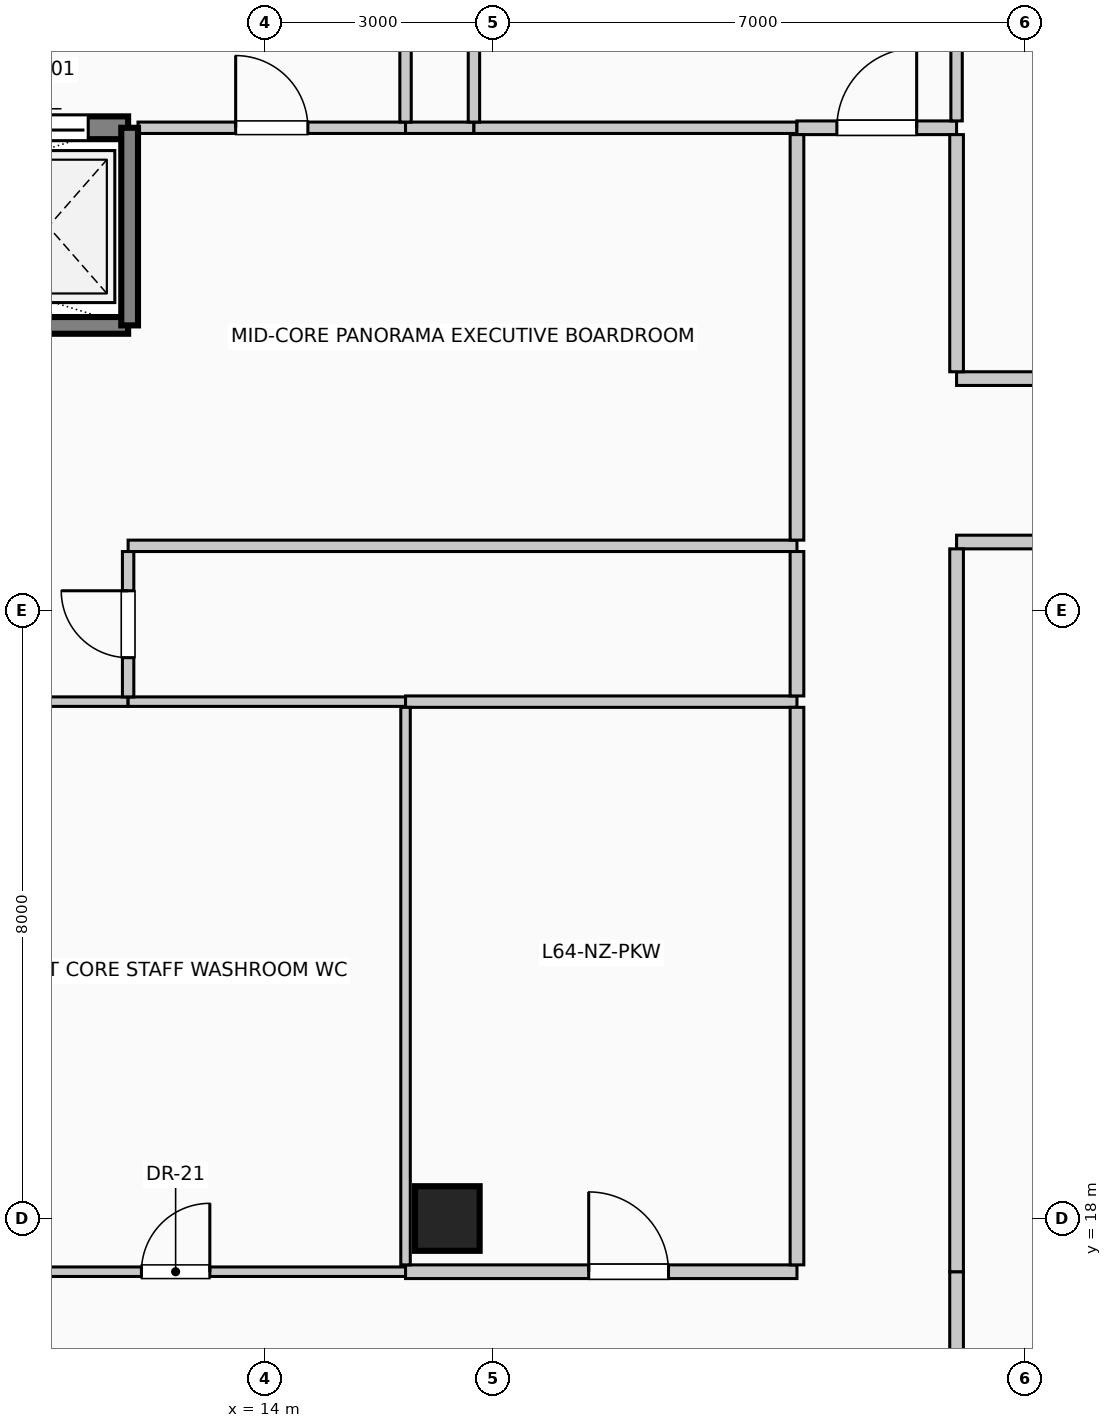
"""IFC4 building model, lengths in metres.
Left out: names, types, materials, properties, quantities, classifications, styles, units other than length and angle.
Written with IfcOpenShell. Run it as: python <this file> out.ifc"""

import sys

from ifc_helpers import new_model, si_unit, direction, frame, frame_2d, origin, origin_2d, place, context, subcontext, project, spatial, rectangle, circle, extrude, element, fill, save


model = new_model("IFC4")
c1 = context("Model", 3, precision=1e-05, world=origin(), true_north=direction((0.0, 1.0)))
c2 = subcontext(c1, "Body", "Model", "MODEL_VIEW")
j1 = project(units=[si_unit("LENGTHUNIT", "METRE"), si_unit("PLANEANGLEUNIT", "RADIAN")], contexts=[c1])
p1 = place(None, origin())
s1 = spatial("IfcSite", under=j1, at=p1, CompositionType="ELEMENT")
p2 = place(p1, origin())
s2 = spatial("IfcBuilding", under=s1, at=p2, CompositionType="ELEMENT")
p3 = place(p2, frame((0.0, 0.0, 264.6)))
s3 = spatial("IfcBuildingStorey", under=s2, at=p3, CompositionType="ELEMENT", Elevation=264.6)
p4 = place(p3, frame((16.4, 18.0, 0.0), z_axis=(0.0, 0.0, 1.0), x_axis=(1.0, 0.0, 0.0)))
e1 = element("IfcColumn", 1, at=p4, inside=s3, PredefinedType="COLUMN", context=c2, shape_type="SweptSolid", body=[
    extrude(circle(Radius=0.425, at=origin_2d()), origin(), (0.0, 0.0, 1.0), 4.0),
])
p5 = place(p3, frame((10.05, 32.35, 0.0), z_axis=(0.0, 0.0, 1.0), x_axis=(1.0, 0.0, 0.0)))
e2 = element("IfcWall", 2, at=p5, inside=s3, PredefinedType="SOLIDWALL", context=c2, shape_type="SweptSolid", body=[
    extrude(rectangle(XDim=2.15, YDim=0.3, at=frame_2d((1.075, 0.0))), origin(), (0.0, 0.0, 1.0), 4.0),
])
p6 = place(p5, frame((0.525, 0.0, 0.0)))
e3 = element("IfcOpeningElement", 3, at=p6, cuts=e2, PredefinedType="OPENING", context=c2, shape_type="SweptSolid", body=[
    extrude(rectangle(XDim=1.1, YDim=2.2, at=frame_2d((0.55, 1.1))), frame((0.0, 0.16, 0.0), z_axis=(0.0, -1.0, 0.0), x_axis=(1.0, 0.0, 0.0)), (0.0, 0.0, 1.0), 0.32),
])
p7 = place(p3, frame((3.55, 29.75, 0.0), z_axis=(0.0, 0.0, 1.0), x_axis=(1.0, 0.0, 0.0)))
e4 = element("IfcWall", 4, at=p7, inside=s3, PredefinedType="SOLIDWALL", context=c2, shape_type="SweptSolid", body=[
    extrude(rectangle(XDim=8.65, YDim=0.22, at=frame_2d((4.325, 0.0))), origin(), (0.0, 0.0, 1.0), 4.0),
])
p8 = place(p3, frame((12.22, 29.75, 0.0), z_axis=(0.0, 0.0, 1.0), x_axis=(0.0, 1.0, 0.0)))
e5 = element("IfcWall", 5, at=p8, inside=s3, PredefinedType="SOLIDWALL", context=c2, shape_type="SweptSolid", body=[
    extrude(rectangle(XDim=2.6, YDim=0.22, at=frame_2d((1.3, 0.0))), origin(), (0.0, 0.0, 1.0), 4.0),
])
p9 = place(p3, frame((9.8, 17.3, 0.0), z_axis=(0.0, 0.0, 1.0), x_axis=(1.0, 0.0, 0.0)))
e6 = element("IfcWall", 6, at=p9, inside=s3, PredefinedType="PARTITIONING", context=c2, shape_type="SweptSolid", body=[
    extrude(rectangle(XDim=6.05, YDim=0.125, at=frame_2d((3.025, 0.0))), origin(), (0.0, 0.0, 1.0), 3.75),
])
p10 = place(p9, frame((2.575, 0.0, 0.0)))
e7 = element("IfcOpeningElement", 7, at=p10, cuts=e6, PredefinedType="OPENING", context=c2, shape_type="SweptSolid", body=[
    extrude(rectangle(XDim=0.9, YDim=2.1, at=frame_2d((0.45, 1.05))), frame((0.0, 0.073, 0.0), z_axis=(0.0, -1.0, 0.0), x_axis=(1.0, 0.0, 0.0)), (0.0, 0.0, 1.0), 0.145),
])
p11 = place(p3, frame((15.85, 17.3, 0.0), z_axis=(0.0, 0.0, 1.0), x_axis=(1.0, 0.0, 0.0)))
e8 = element("IfcWall", 8, at=p11, inside=s3, PredefinedType="PARTITIONING", context=c2, shape_type="SweptSolid", body=[
    extrude(rectangle(XDim=5.15, YDim=0.18, at=frame_2d((2.575, 0.0))), origin(), (0.0, 0.0, 1.0), 3.75),
])
p12 = place(p11, frame((2.41, 0.0, 0.0)))
e9 = element("IfcOpeningElement", 9, at=p12, cuts=e8, PredefinedType="OPENING", context=c2, shape_type="SweptSolid", body=[
    extrude(rectangle(XDim=1.05, YDim=2.15, at=frame_2d((0.525, 1.075))), frame((0.0, 0.1, 0.0), z_axis=(0.0, -1.0, 0.0), x_axis=(1.0, 0.0, 0.0)), (0.0, 0.0, 1.0), 0.2),
])
p13 = place(p3, frame((9.8, 24.8, 0.0), z_axis=(0.0, 0.0, 1.0), x_axis=(1.0, 0.0, 0.0)))
e10 = element("IfcWall", 10, at=p13, inside=s3, PredefinedType="PARTITIONING", context=c2, shape_type="SweptSolid", body=[
    extrude(rectangle(XDim=2.4, YDim=0.125, at=frame_2d((1.2, 0.0))), origin(), (0.0, 0.0, 1.0), 3.75),
])
p14 = place(p3, frame((12.2, 24.8, 0.0), z_axis=(0.0, 0.0, 1.0), x_axis=(1.0, 0.0, 0.0)))
e11 = element("IfcWall", 11, at=p14, inside=s3, PredefinedType="PARTITIONING", context=c2, shape_type="SweptSolid", body=[
    extrude(rectangle(XDim=3.65, YDim=0.125, at=frame_2d((1.825, 0.0))), origin(), (0.0, 0.0, 1.0), 3.75),
])
p15 = place(p3, frame((15.85, 24.8, 0.0), z_axis=(0.0, 0.0, 1.0), x_axis=(1.0, 0.0, 0.0)))
e12 = element("IfcWall", 12, at=p15, inside=s3, PredefinedType="PARTITIONING", context=c2, shape_type="SweptSolid", body=[
    extrude(rectangle(XDim=5.15, YDim=0.15, at=frame_2d((2.575, 0.0))), origin(), (0.0, 0.0, 1.0), 3.75),
])
p16 = place(p3, frame((12.2, 26.85, 0.0), z_axis=(0.0, 0.0, 1.0), x_axis=(1.0, 0.0, 0.0)))
e13 = element("IfcWall", 13, at=p16, inside=s3, PredefinedType="PARTITIONING", context=c2, shape_type="SweptSolid", body=[
    extrude(rectangle(XDim=8.8, YDim=0.15, at=frame_2d((4.4, 0.0))), origin(), (0.0, 0.0, 1.0), 3.75),
])
p17 = place(p3, frame((23.1, 26.9, 0.0), z_axis=(0.0, 0.0, 1.0), x_axis=(1.0, 0.0, 0.0)))
e14 = element("IfcWall", 14, at=p17, inside=s3, PredefinedType="PARTITIONING", context=c2, shape_type="SweptSolid", body=[
    extrude(rectangle(XDim=4.12, YDim=0.18, at=frame_2d((2.06, 0.0))), origin(), (0.0, 0.0, 1.0), 3.75),
])
p18 = place(p17, frame((1.535, 0.0, 0.0)))
e15 = element("IfcOpeningElement", 15, at=p18, cuts=e14, PredefinedType="OPENING", context=c2, shape_type="SweptSolid", body=[
    extrude(rectangle(XDim=1.05, YDim=2.15, at=frame_2d((0.525, 1.075))), frame((0.0, 0.1, 0.0), z_axis=(0.0, -1.0, 0.0), x_axis=(1.0, 0.0, 0.0)), (0.0, 0.0, 1.0), 0.2),
])
p19 = place(p3, frame((23.1, 29.05, 0.0), z_axis=(0.0, 0.0, 1.0), x_axis=(1.0, 0.0, 0.0)))
e16 = element("IfcWall", 16, at=p19, inside=s3, PredefinedType="PARTITIONING", context=c2, shape_type="SweptSolid", body=[
    extrude(rectangle(XDim=7.13, YDim=0.18, at=frame_2d((3.565, 0.0))), origin(), (0.0, 0.0, 1.0), 3.75),
])
p20 = place(p19, frame((3.09, 0.0, 0.0)))
e17 = element("IfcOpeningElement", 17, at=p20, cuts=e16, PredefinedType="OPENING", context=c2, shape_type="SweptSolid", body=[
    extrude(rectangle(XDim=0.95, YDim=2.15, at=frame_2d((0.475, 1.075))), frame((0.0, 0.1, 0.0), z_axis=(0.0, -1.0, 0.0), x_axis=(1.0, 0.0, 0.0)), (0.0, 0.0, 1.0), 0.2),
])
p21 = place(p3, frame((12.33, 32.35, 0.0), z_axis=(0.0, 0.0, 1.0), x_axis=(1.0, 0.0, 0.0)))
e18 = element("IfcWall", 18, at=p21, inside=s3, PredefinedType="PARTITIONING", context=c2, shape_type="SweptSolid", body=[
    extrude(rectangle(XDim=3.52, YDim=0.15, at=frame_2d((1.76, 0.0))), origin(), (0.0, 0.0, 1.0), 3.75),
])
p22 = place(p21, frame((1.285, 0.0, 0.0)))
e19 = element("IfcOpeningElement", 19, at=p22, cuts=e18, PredefinedType="OPENING", context=c2, shape_type="SweptSolid", body=[
    extrude(rectangle(XDim=0.95, YDim=2.15, at=frame_2d((0.475, 1.075))), frame((0.0, 0.085, 0.0), z_axis=(0.0, -1.0, 0.0), x_axis=(1.0, 0.0, 0.0)), (0.0, 0.0, 1.0), 0.17),
])
p23 = place(p3, frame((15.85, 32.35, 0.0), z_axis=(0.0, 0.0, 1.0), x_axis=(1.0, 0.0, 0.0)))
e20 = element("IfcWall", 20, at=p23, inside=s3, PredefinedType="PARTITIONING", context=c2, shape_type="SweptSolid", body=[
    extrude(rectangle(XDim=0.9, YDim=0.15, at=frame_2d((0.45, 0.0))), origin(), (0.0, 0.0, 1.0), 3.75),
])
p24 = place(p3, frame((16.75, 32.35, 0.0), z_axis=(0.0, 0.0, 1.0), x_axis=(1.0, 0.0, 0.0)))
e21 = element("IfcWall", 21, at=p24, inside=s3, PredefinedType="PARTITIONING", context=c2, shape_type="SweptSolid", body=[
    extrude(rectangle(XDim=4.25, YDim=0.15, at=frame_2d((2.125, 0.0))), origin(), (0.0, 0.0, 1.0), 3.75),
])
p25 = place(p3, frame((21.0, 32.35, 0.0), z_axis=(0.0, 0.0, 1.0), x_axis=(1.0, 0.0, 0.0)))
e22 = element("IfcWall", 22, at=p25, inside=s3, PredefinedType="PARTITIONING", context=c2, shape_type="SweptSolid", body=[
    extrude(rectangle(XDim=2.1, YDim=0.18, at=frame_2d((1.05, 0.0))), origin(), (0.0, 0.0, 1.0), 3.75),
])
p26 = place(p25, frame((0.525, 0.0, 0.0)))
e23 = element("IfcOpeningElement", 23, at=p26, cuts=e22, PredefinedType="OPENING", context=c2, shape_type="SweptSolid", body=[
    extrude(rectangle(XDim=1.05, YDim=2.15, at=frame_2d((0.525, 1.075))), frame((0.0, 0.1, 0.0), z_axis=(0.0, -1.0, 0.0), x_axis=(1.0, 0.0, 0.0)), (0.0, 0.0, 1.0), 0.2),
])
p27 = place(p3, frame((12.2, 24.863, 0.0), z_axis=(0.0, 0.0, 1.0), x_axis=(0.0, 1.0, 0.0)))
e24 = element("IfcWall", 24, at=p27, inside=s3, PredefinedType="PARTITIONING", context=c2, shape_type="SweptSolid", body=[
    extrude(rectangle(XDim=1.912, YDim=0.15, at=frame_2d((0.956, 0.0))), origin(), (0.0, 0.0, 1.0), 3.75),
])
p28 = place(p27, frame((0.516, 0.0, 0.0)))
e25 = element("IfcOpeningElement", 25, at=p28, cuts=e24, PredefinedType="OPENING", context=c2, shape_type="SweptSolid", body=[
    extrude(rectangle(XDim=0.88, YDim=2.1, at=frame_2d((0.44, 1.05))), frame((0.0, 0.085, 0.0), z_axis=(0.0, -1.0, 0.0), x_axis=(1.0, 0.0, 0.0)), (0.0, 0.0, 1.0), 0.17),
])
p29 = place(p3, frame((15.85, 17.39, 0.0), z_axis=(0.0, 0.0, 1.0), x_axis=(0.0, 1.0, 0.0)))
e26 = element("IfcWall", 26, at=p29, inside=s3, PredefinedType="PARTITIONING", context=c2, shape_type="SweptSolid", body=[
    extrude(rectangle(XDim=7.335, YDim=0.125, at=frame_2d((3.667, 0.0))), origin(), (0.0, 0.0, 1.0), 3.75),
])
p30 = place(p3, frame((15.85, 32.425, 0.0), z_axis=(0.0, 0.0, 1.0), x_axis=(0.0, 1.0, 0.0)))
e27 = element("IfcWall", 27, at=p30, inside=s3, PredefinedType="PARTITIONING", context=c2, shape_type="SweptSolid", body=[
    extrude(rectangle(XDim=1.725, YDim=0.15, at=frame_2d((0.862, 0.0))), origin(), (0.0, 0.0, 1.0), 3.75),
])
p31 = place(p3, frame((16.75, 32.425, 0.0), z_axis=(0.0, 0.0, 1.0), x_axis=(0.0, 1.0, 0.0)))
e28 = element("IfcWall", 28, at=p31, inside=s3, PredefinedType="PARTITIONING", context=c2, shape_type="SweptSolid", body=[
    extrude(rectangle(XDim=1.15, YDim=0.15, at=frame_2d((0.575, 0.0))), origin(), (0.0, 0.0, 1.0), 3.75),
])
p32 = place(p3, frame((21.0, 17.39, 0.0), z_axis=(0.0, 0.0, 1.0), x_axis=(0.0, 1.0, 0.0)))
e29 = element("IfcWall", 29, at=p32, inside=s3, PredefinedType="PARTITIONING", context=c2, shape_type="SweptSolid", body=[
    extrude(rectangle(XDim=7.335, YDim=0.18, at=frame_2d((3.667, 0.0))), origin(), (0.0, 0.0, 1.0), 3.75),
])
p33 = place(p3, frame((21.0, 24.875, 0.0), z_axis=(0.0, 0.0, 1.0), x_axis=(0.0, 1.0, 0.0)))
e30 = element("IfcWall", 30, at=p33, inside=s3, PredefinedType="PARTITIONING", context=c2, shape_type="SweptSolid", body=[
    extrude(rectangle(XDim=1.9, YDim=0.18, at=frame_2d((0.95, 0.0))), origin(), (0.0, 0.0, 1.0), 3.75),
])
p34 = place(p3, frame((21.0, 26.925, 0.0), z_axis=(0.0, 0.0, 1.0), x_axis=(0.0, 1.0, 0.0)))
e31 = element("IfcWall", 31, at=p34, inside=s3, PredefinedType="PARTITIONING", context=c2, shape_type="SweptSolid", body=[
    extrude(rectangle(XDim=5.335, YDim=0.18, at=frame_2d((2.667, 0.0))), origin(), (0.0, 0.0, 1.0), 3.75),
])
p35 = place(p3, frame((23.1, 15.29, 0.0), z_axis=(0.0, 0.0, 1.0), x_axis=(0.0, 1.0, 0.0)))
e32 = element("IfcWall", 32, at=p35, inside=s3, PredefinedType="PARTITIONING", context=c2, shape_type="SweptSolid", body=[
    extrude(rectangle(XDim=2.01, YDim=0.18, at=frame_2d((1.005, 0.0))), origin(), (0.0, 0.0, 1.0), 3.75),
])
p36 = place(p3, frame((23.1, 17.3, 0.0), z_axis=(0.0, 0.0, 1.0), x_axis=(0.0, 1.0, 0.0)))
e33 = element("IfcWall", 33, at=p36, inside=s3, PredefinedType="PARTITIONING", context=c2, shape_type="SweptSolid", body=[
    extrude(rectangle(XDim=9.51, YDim=0.18, at=frame_2d((4.755, 0.0))), origin(), (0.0, 0.0, 1.0), 3.75),
])
p37 = place(p3, frame((23.1, 29.14, 0.0), z_axis=(0.0, 0.0, 1.0), x_axis=(0.0, 1.0, 0.0)))
e34 = element("IfcWall", 34, at=p37, inside=s3, PredefinedType="PARTITIONING", context=c2, shape_type="SweptSolid", body=[
    extrude(rectangle(XDim=3.12, YDim=0.18, at=frame_2d((1.56, 0.0))), origin(), (0.0, 0.0, 1.0), 3.75),
])
p38 = place(p3, frame((23.1, 32.44, 0.0), z_axis=(0.0, 0.0, 1.0), x_axis=(0.0, 1.0, 0.0)))
e35 = element("IfcWall", 35, at=p38, inside=s3, PredefinedType="PARTITIONING", context=c2, shape_type="SweptSolid", body=[
    extrude(rectangle(XDim=12.84, YDim=0.15, at=frame_2d((6.42, 0.0))), origin(), (0.0, 0.0, 1.0), 3.75),
])
p39 = place(p6, origin())
e36 = element("IfcDoor", 36, at=p39, inside=s3, OperationType="SLIDING_TO_RIGHT", PredefinedType="DOOR", context=c2, shape_type="SweptSolid", body=[
    extrude(rectangle(XDim=1.1, YDim=2.2, at=frame_2d((0.55, 1.1))), frame((0.0, 0.025, 0.0), z_axis=(0.0, -1.0, 0.0), x_axis=(1.0, 0.0, 0.0)), (0.0, 0.0, 1.0), 0.05),
])
fill(e3, e36)
p40 = place(p10, origin())
e37 = element("IfcDoor", 37, at=p40, inside=s3, OperationType="SINGLE_SWING_RIGHT", PredefinedType="DOOR", context=c2, shape_type="SweptSolid", body=[
    extrude(rectangle(XDim=0.9, YDim=2.1, at=frame_2d((0.45, 1.05))), frame((0.0, 0.025, 0.0), z_axis=(0.0, -1.0, 0.0), x_axis=(1.0, 0.0, 0.0)), (0.0, 0.0, 1.0), 0.05),
])
fill(e7, e37)
p41 = place(p12, origin())
e38 = element("IfcDoor", 38, at=p41, inside=s3, OperationType="SINGLE_SWING_LEFT", PredefinedType="DOOR", context=c2, shape_type="SweptSolid", body=[
    extrude(rectangle(XDim=1.05, YDim=2.15, at=frame_2d((0.525, 1.075))), frame((0.0, 0.025, 0.0), z_axis=(0.0, -1.0, 0.0), x_axis=(1.0, 0.0, 0.0)), (0.0, 0.0, 1.0), 0.05),
])
fill(e9, e38)
p42 = place(p22, origin())
e39 = element("IfcDoor", 39, at=p42, inside=s3, OperationType="SINGLE_SWING_LEFT", PredefinedType="DOOR", context=c2, shape_type="SweptSolid", body=[
    extrude(rectangle(XDim=0.95, YDim=2.15, at=frame_2d((0.475, 1.075))), frame((0.0, 0.025, 0.0), z_axis=(0.0, -1.0, 0.0), x_axis=(1.0, 0.0, 0.0)), (0.0, 0.0, 1.0), 0.05),
])
fill(e19, e39)
p43 = place(p26, origin())
e40 = element("IfcDoor", 40, at=p43, inside=s3, OperationType="SINGLE_SWING_RIGHT", PredefinedType="DOOR", context=c2, shape_type="SweptSolid", body=[
    extrude(rectangle(XDim=1.05, YDim=2.15, at=frame_2d((0.525, 1.075))), frame((0.0, 0.025, 0.0), z_axis=(0.0, -1.0, 0.0), x_axis=(1.0, 0.0, 0.0)), (0.0, 0.0, 1.0), 0.05),
])
fill(e23, e40)
p44 = place(p28, origin())
e41 = element("IfcDoor", 41, at=p44, inside=s3, OperationType="SINGLE_SWING_RIGHT", PredefinedType="DOOR", context=c2, shape_type="SweptSolid", body=[
    extrude(rectangle(XDim=0.88, YDim=2.1, at=frame_2d((0.44, 1.05))), frame((0.0, 0.025, 0.0), z_axis=(0.0, -1.0, 0.0), x_axis=(1.0, 0.0, 0.0)), (0.0, 0.0, 1.0), 0.05),
])
fill(e25, e41)
save(model, sys.argv[1])
